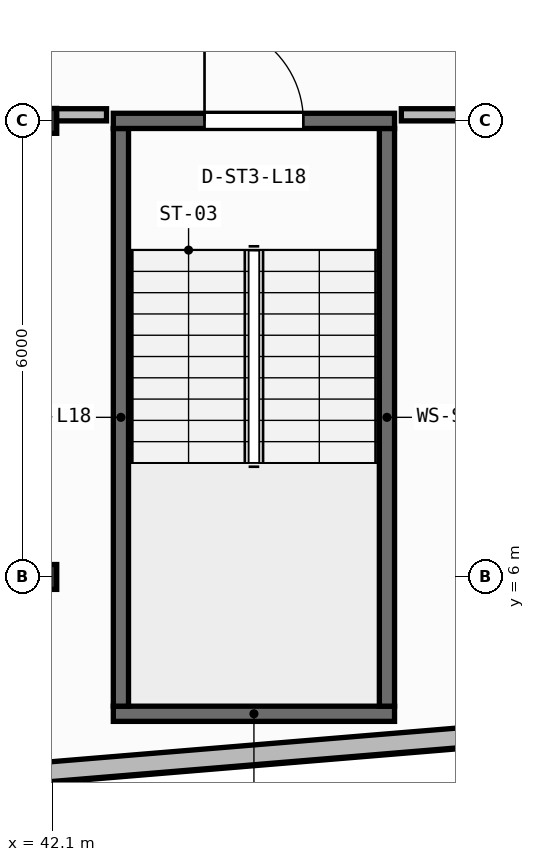
"""IFC4 building model, lengths in metres.
Left out: names, types, materials, properties, quantities, classifications, styles, units other than length and angle.
Written with IfcOpenShell. Run it as: python <this file> out.ifc"""

import sys

from ifc_helpers import new_model, si_unit, direction, frame, frame_2d, origin, origin_2d, place, context, subcontext, project, spatial, rectangle, i_section, extrude, element, fill, save


model = new_model("IFC4")
c1 = context("Model", 3, precision=1e-05, world=origin(), true_north=direction((0.0, 1.0)))
c2 = subcontext(c1, "Body", "Model", "MODEL_VIEW")
j1 = project(units=[si_unit("LENGTHUNIT", "METRE"), si_unit("PLANEANGLEUNIT", "RADIAN")], contexts=[c1])
p1 = place(None, origin())
s1 = spatial("IfcSite", under=j1, at=p1, CompositionType="ELEMENT")
p2 = place(p1, origin())
s2 = spatial("IfcBuilding", under=s1, at=p2, CompositionType="ELEMENT")
p3 = place(p2, frame((0.0, 0.0, 73.85)))
s3 = spatial("IfcBuildingStorey", under=s2, at=p3, CompositionType="ELEMENT", Elevation=73.85)
for number, where, z_axis, x_axis in (
    (1, (42.0, 6.0, 0.0), (0.0, 0.0, 1.0), (1.0, 0.0, 0.0)),
    (2, (42.0, 12.0, 0.0), (0.0, 0.0, 1.0), (1.0, 0.0, 0.0)),
):
    element("IfcColumn", number, at=place(p3, frame(where, z_axis=z_axis, x_axis=x_axis)), inside=s3, PredefinedType="COLUMN", context=c2, shape_type="SweptSolid", body=[
        extrude(i_section(OverallWidth=0.311, OverallDepth=0.327, WebThickness=0.016, FlangeThickness=0.025, FilletRadius=0.017, at=origin_2d()), origin(), (0.0, 0.0, 1.0), 3.95),
    ])
p4 = place(p3, frame((2.76, 0.174, 0.0), z_axis=(0.0, 0.0, 1.0), x_axis=(0.996571478456, 0.082736257641, 0.0)))
e3 = element("IfcWall", 3, at=p4, inside=s3, PredefinedType="STANDARD", context=c2, shape_type="SweptSolid", body=[
    extrude(rectangle(XDim=52.861, YDim=0.26, at=frame_2d((26.431, 0.0))), origin(), (0.0, 0.0, 1.0), 3.71),
])
p5 = place(p4, frame((25.231, 0.0, 0.9)))
e4 = element("IfcOpeningElement", 4, at=p5, cuts=e3, PredefinedType="OPENING", context=c2, shape_type="SweptSolid", body=[
    extrude(rectangle(XDim=2.4, YDim=1.65, at=frame_2d((1.2, 0.825))), frame((0.0, 0.14, 0.0), z_axis=(0.0, -1.0, 0.0), x_axis=(1.0, 0.0, 0.0)), (0.0, 0.0, 1.0), 0.28),
])
p6 = place(p3, frame((42.9, 4.2, 0.0), z_axis=(0.0, 0.0, 1.0), x_axis=(1.0, 0.0, 0.0)))
e5 = element("IfcWall", 5, at=p6, inside=s3, PredefinedType="SHEAR", context=c2, shape_type="SweptSolid", body=[
    extrude(rectangle(XDim=3.7, YDim=0.2, at=frame_2d((1.85, 0.0))), origin(), (0.0, 0.0, 1.0), 3.71),
])
for number, where, z_axis, x_axis in (
    (6, (43.0, 4.3, 0.0), (0.0, 0.0, 1.0), (0.0, 1.0, 0.0)),
    (7, (46.5, 4.3, 0.0), (0.0, 0.0, 1.0), (0.0, 1.0, 0.0)),
):
    element("IfcWall", number, at=place(p3, frame(where, z_axis=z_axis, x_axis=x_axis)), inside=s3, PredefinedType="SHEAR", context=c2, shape_type="SweptSolid", body=[
        extrude(rectangle(XDim=7.6, YDim=0.2, at=frame_2d((3.8, 0.0))), origin(), (0.0, 0.0, 1.0), 3.71),
    ])
p7 = place(p3, frame((42.9, 12.0, 0.0), z_axis=(0.0, 0.0, 1.0), x_axis=(1.0, 0.0, 0.0)))
e8 = element("IfcWall", 8, at=p7, inside=s3, PredefinedType="SHEAR", context=c2, shape_type="SweptSolid", body=[
    extrude(rectangle(XDim=3.7, YDim=0.2, at=frame_2d((1.85, 0.0))), origin(), (0.0, 0.0, 1.0), 3.71),
])
p8 = place(p7, frame((1.2, 0.0, 0.0)))
e9 = element("IfcOpeningElement", 9, at=p8, cuts=e8, PredefinedType="OPENING", context=c2, shape_type="SweptSolid", body=[
    extrude(rectangle(XDim=1.3, YDim=2.15, at=frame_2d((0.65, 1.075))), frame((0.0, 0.11, 0.0), z_axis=(0.0, -1.0, 0.0), x_axis=(1.0, 0.0, 0.0)), (0.0, 0.0, 1.0), 0.22),
])
p9 = place(p3, frame((31.63, 12.08, 0.0), z_axis=(0.0, 0.0, 1.0), x_axis=(1.0, 0.0, 0.0)))
e10 = element("IfcWall", 10, at=p9, inside=s3, PredefinedType="PARTITIONING", context=c2, shape_type="SweptSolid", body=[
    extrude(rectangle(XDim=11.181, YDim=0.16, at=frame_2d((5.59, 0.0))), origin(), (0.0, 0.0, 1.0), 3.073),
])
p10 = place(p3, frame((46.689, 12.08, 0.0), z_axis=(0.0, 0.0, 1.0), x_axis=(1.0, 0.0, 0.0)))
e11 = element("IfcWall", 11, at=p10, inside=s3, PredefinedType="PARTITIONING", context=c2, shape_type="SweptSolid", body=[
    extrude(rectangle(XDim=3.011, YDim=0.16, at=frame_2d((1.505, 0.0))), origin(), (0.0, 0.0, 1.0), 3.073),
])
p11 = place(p8, origin())
e12 = element("IfcDoor", 12, at=p11, inside=s3, OperationType="SINGLE_SWING_LEFT", PredefinedType="DOOR", context=c2, shape_type="SweptSolid", body=[
    extrude(rectangle(XDim=1.3, YDim=2.15, at=frame_2d((0.65, 1.075))), frame((0.0, 0.025, 0.0), z_axis=(0.0, -1.0, 0.0), x_axis=(1.0, 0.0, 0.0)), (0.0, 0.0, 1.0), 0.05),
])
fill(e9, e12)
save(model, sys.argv[1])
